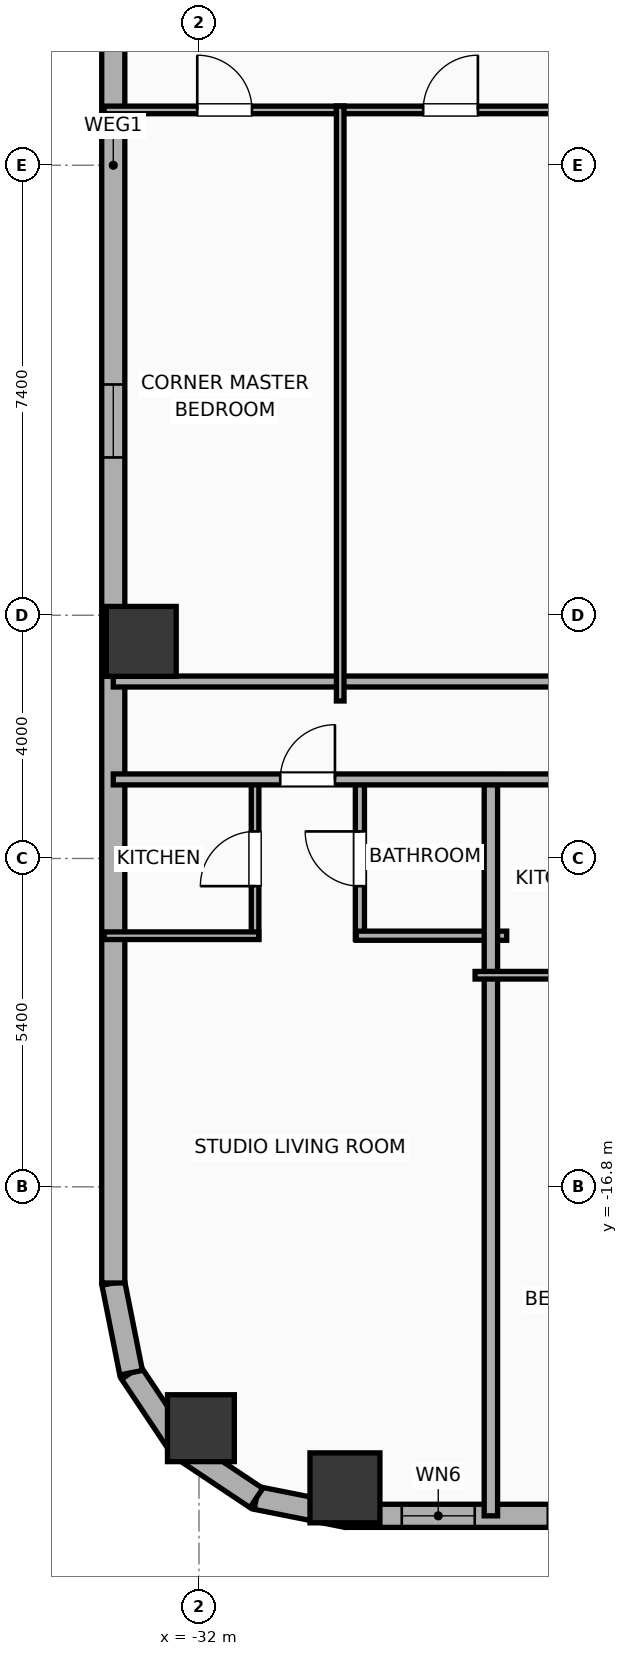
"""IFC4 building model, lengths in metres.
Left out: names, types, materials, properties, quantities, classifications, styles, units other than length and angle.
Written with IfcOpenShell. Run it as: python <this file> out.ifc"""

import sys

from ifc_helpers import new_model, si_unit, direction, frame, frame_2d, origin, origin_2d, place, context, subcontext, project, spatial, rectangle, hollow_rectangle, hollow_circle, extrude, element, fill, save


model = new_model("IFC4")
c1 = context("Model", 3, precision=1e-05, world=origin(), true_north=direction((0.0, 1.0)))
c2 = subcontext(c1, "Body", "Model", "MODEL_VIEW")
j1 = project(units=[si_unit("LENGTHUNIT", "METRE"), si_unit("PLANEANGLEUNIT", "RADIAN")], contexts=[c1])
p1 = place(None, origin())
s1 = spatial("IfcSite", under=j1, at=p1, CompositionType="ELEMENT")
p2 = place(p1, origin())
s2 = spatial("IfcBuilding", under=s1, at=p2, CompositionType="ELEMENT")
p3 = place(p2, frame((0.0, 0.0, 45.5)))
s3 = spatial("IfcBuildingStorey", under=s2, at=p3, CompositionType="ELEMENT", Elevation=45.5)
for number, where, z_axis, x_axis in (
    (1, (-29.6, -21.75, 0.0), (0.0, 0.0, 1.0), (1.0, 0.0, 0.0)),
    (2, (-32.95, -7.83, 0.0), (0.0, 0.0, 1.0), (1.0, 0.0, 0.0)),
):
    element("IfcColumn", number, at=place(p3, frame(where, z_axis=z_axis, x_axis=x_axis)), inside=s3, PredefinedType="COLUMN", context=c2, shape_type="SweptSolid", body=[
        extrude(hollow_rectangle(XDim=1.15, YDim=1.15, WallThickness=0.04, at=origin_2d()), origin(), (0.0, 0.0, 1.0), 3.9),
    ])
p4 = place(p3, frame((-31.969, -20.769, 0.0), z_axis=(0.0, 0.0, 1.0), x_axis=(1.0, 0.0, 0.0)))
e3 = element("IfcColumn", 3, at=p4, inside=s3, PredefinedType="COLUMN", context=c2, shape_type="SweptSolid", body=[
    extrude(hollow_circle(Radius=0.55, WallThickness=0.036, at=origin_2d()), origin(), (0.0, 0.0, 1.0), 3.9),
])
p5 = place(p3, frame((22.381, -22.21, 0.0), z_axis=(0.0, 0.0, 1.0), x_axis=(-1.0, 0.0, 0.0)))
e4 = element("IfcWall", 4, at=p5, inside=s3, PredefinedType="ELEMENTEDWALL", context=c2, shape_type="SweptSolid", body=[
    extrude(rectangle(XDim=51.963, YDim=0.38, at=frame_2d((25.981, 0.0))), origin(), (0.0, 0.0, 1.0), 3.65),
])
p6 = place(p5, frame((42.952, 0.0, 0.75)))
e5 = element("IfcOpeningElement", 5, at=p6, cuts=e4, PredefinedType="OPENING", context=c2, shape_type="SweptSolid", body=[
    extrude(rectangle(XDim=2.4, YDim=2.1, at=frame_2d((1.2, 1.05))), frame((0.0, 0.2, 0.0), z_axis=(0.0, -1.0, 0.0), x_axis=(1.0, 0.0, 0.0)), (0.0, 0.0, 1.0), 0.4),
])
p7 = place(p5, frame((49.847, 0.0, 0.75)))
e6 = element("IfcOpeningElement", 6, at=p7, cuts=e4, PredefinedType="OPENING", context=c2, shape_type="SweptSolid", body=[
    extrude(rectangle(XDim=1.2, YDim=2.05, at=frame_2d((0.6, 1.025))), frame((0.0, 0.2, 0.0), z_axis=(0.0, -1.0, 0.0), x_axis=(1.0, 0.0, 0.0)), (0.0, 0.0, 1.0), 0.4),
])
p8 = place(p5, frame((47.445, 0.0, 0.75)))
e7 = element("IfcOpeningElement", 7, at=p8, cuts=e4, PredefinedType="OPENING", context=c2, shape_type="SweptSolid", body=[
    extrude(rectangle(XDim=1.2, YDim=2.05, at=frame_2d((0.6, 1.025))), frame((0.0, 0.2, 0.0), z_axis=(0.0, -1.0, 0.0), x_axis=(1.0, 0.0, 0.0)), (0.0, 0.0, 1.0), 0.4),
])
p9 = place(p5, frame((39.526, 0.0, 0.75)))
e8 = element("IfcOpeningElement", 8, at=p9, cuts=e4, PredefinedType="OPENING", context=c2, shape_type="SweptSolid", body=[
    extrude(rectangle(XDim=1.2, YDim=2.05, at=frame_2d((0.6, 1.025))), frame((0.0, 0.2, 0.0), z_axis=(0.0, -1.0, 0.0), x_axis=(1.0, 0.0, 0.0)), (0.0, 0.0, 1.0), 0.4),
])
p10 = place(p5, frame((33.018, 0.0, 0.75)))
e9 = element("IfcOpeningElement", 9, at=p10, cuts=e4, PredefinedType="OPENING", context=c2, shape_type="SweptSolid", body=[
    extrude(rectangle(XDim=1.2, YDim=2.05, at=frame_2d((0.6, 1.025))), frame((0.0, 0.2, 0.0), z_axis=(0.0, -1.0, 0.0), x_axis=(1.0, 0.0, 0.0)), (0.0, 0.0, 1.0), 0.4),
])
p11 = place(p5, frame((36.813, 0.0, 0.75)))
e10 = element("IfcOpeningElement", 10, at=p11, cuts=e4, PredefinedType="OPENING", context=c2, shape_type="SweptSolid", body=[
    extrude(rectangle(XDim=1.2, YDim=2.05, at=frame_2d((0.6, 1.025))), frame((0.0, 0.2, 0.0), z_axis=(0.0, -1.0, 0.0), x_axis=(1.0, 0.0, 0.0)), (0.0, 0.0, 1.0), 0.4),
])
p12 = place(p5, frame((28.886, 0.0, 0.75)))
e11 = element("IfcOpeningElement", 11, at=p12, cuts=e4, PredefinedType="OPENING", context=c2, shape_type="SweptSolid", body=[
    extrude(rectangle(XDim=1.2, YDim=2.05, at=frame_2d((0.6, 1.025))), frame((0.0, 0.2, 0.0), z_axis=(0.0, -1.0, 0.0), x_axis=(1.0, 0.0, 0.0)), (0.0, 0.0, 1.0), 0.4),
])
p13 = place(p5, frame((23.306, 0.0, 0.75)))
e12 = element("IfcOpeningElement", 12, at=p13, cuts=e4, PredefinedType="OPENING", context=c2, shape_type="SweptSolid", body=[
    extrude(rectangle(XDim=1.2, YDim=2.05, at=frame_2d((0.6, 1.025))), frame((0.0, 0.2, 0.0), z_axis=(0.0, -1.0, 0.0), x_axis=(1.0, 0.0, 0.0)), (0.0, 0.0, 1.0), 0.4),
])
p14 = place(p5, frame((26.056, 0.0, 0.75)))
e13 = element("IfcOpeningElement", 13, at=p14, cuts=e4, PredefinedType="OPENING", context=c2, shape_type="SweptSolid", body=[
    extrude(rectangle(XDim=1.2, YDim=2.05, at=frame_2d((0.6, 1.025))), frame((0.0, 0.2, 0.0), z_axis=(0.0, -1.0, 0.0), x_axis=(1.0, 0.0, 0.0)), (0.0, 0.0, 1.0), 0.4),
])
p15 = place(p5, frame((18.811, 0.0, 0.75)))
e14 = element("IfcOpeningElement", 14, at=p15, cuts=e4, PredefinedType="OPENING", context=c2, shape_type="SweptSolid", body=[
    extrude(rectangle(XDim=1.2, YDim=2.05, at=frame_2d((0.6, 1.025))), frame((0.0, 0.2, 0.0), z_axis=(0.0, -1.0, 0.0), x_axis=(1.0, 0.0, 0.0)), (0.0, 0.0, 1.0), 0.4),
])
p16 = place(p5, frame((14.602, 0.0, 0.75)))
e15 = element("IfcOpeningElement", 15, at=p16, cuts=e4, PredefinedType="OPENING", context=c2, shape_type="SweptSolid", body=[
    extrude(rectangle(XDim=1.2, YDim=2.05, at=frame_2d((0.6, 1.025))), frame((0.0, 0.2, 0.0), z_axis=(0.0, -1.0, 0.0), x_axis=(1.0, 0.0, 0.0)), (0.0, 0.0, 1.0), 0.4),
])
p17 = place(p5, frame((11.852, 0.0, 0.75)))
e16 = element("IfcOpeningElement", 16, at=p17, cuts=e4, PredefinedType="OPENING", context=c2, shape_type="SweptSolid", body=[
    extrude(rectangle(XDim=1.2, YDim=2.05, at=frame_2d((0.6, 1.025))), frame((0.0, 0.2, 0.0), z_axis=(0.0, -1.0, 0.0), x_axis=(1.0, 0.0, 0.0)), (0.0, 0.0, 1.0), 0.4),
])
p18 = place(p5, frame((8.316, 0.0, 0.75)))
e17 = element("IfcOpeningElement", 17, at=p18, cuts=e4, PredefinedType="OPENING", context=c2, shape_type="SweptSolid", body=[
    extrude(rectangle(XDim=1.2, YDim=2.05, at=frame_2d((0.6, 1.025))), frame((0.0, 0.2, 0.0), z_axis=(0.0, -1.0, 0.0), x_axis=(1.0, 0.0, 0.0)), (0.0, 0.0, 1.0), 0.4),
])
p19 = place(p5, frame((6.286, 0.0, 0.75)))
e18 = element("IfcOpeningElement", 18, at=p19, cuts=e4, PredefinedType="OPENING", context=c2, shape_type="SweptSolid", body=[
    extrude(rectangle(XDim=1.2, YDim=2.05, at=frame_2d((0.6, 1.025))), frame((0.0, 0.2, 0.0), z_axis=(0.0, -1.0, 0.0), x_axis=(1.0, 0.0, 0.0)), (0.0, 0.0, 1.0), 0.4),
])
p20 = place(p5, frame((3.737, 0.0, 0.75)))
e19 = element("IfcOpeningElement", 19, at=p20, cuts=e4, PredefinedType="OPENING", context=c2, shape_type="SweptSolid", body=[
    extrude(rectangle(XDim=1.2, YDim=2.05, at=frame_2d((0.6, 1.025))), frame((0.0, 0.2, 0.0), z_axis=(0.0, -1.0, 0.0), x_axis=(1.0, 0.0, 0.0)), (0.0, 0.0, 1.0), 0.4),
])
p21 = place(p5, frame((1.291, 0.0, 0.75)))
e20 = element("IfcOpeningElement", 20, at=p21, cuts=e4, PredefinedType="OPENING", context=c2, shape_type="SweptSolid", body=[
    extrude(rectangle(XDim=1.2, YDim=2.05, at=frame_2d((0.6, 1.025))), frame((0.0, 0.2, 0.0), z_axis=(0.0, -1.0, 0.0), x_axis=(1.0, 0.0, 0.0)), (0.0, 0.0, 1.0), 0.4),
])
p22 = place(p3, frame((-29.581, -22.21, 0.0), z_axis=(0.0, 0.0, 1.0), x_axis=(-0.980786132421, 0.195086038585, 0.0)))
e21 = element("IfcWall", 21, at=p22, inside=s3, PredefinedType="ELEMENTEDWALL", context=c2, shape_type="SweptSolid", body=[
    extrude(rectangle(XDim=1.504, YDim=0.38, at=frame_2d((0.752, 0.0))), origin(), (0.0, 0.0, 1.0), 3.65),
])
p23 = place(p3, frame((-31.057, -21.917, 0.0), z_axis=(0.0, 0.0, 1.0), x_axis=(-0.831442848281, 0.555610286119, 0.0)))
e22 = element("IfcWall", 22, at=p23, inside=s3, PredefinedType="ELEMENTEDWALL", context=c2, shape_type="SweptSolid", body=[
    extrude(rectangle(XDim=1.485, YDim=0.38, at=frame_2d((0.743, 0.0))), origin(), (0.0, 0.0, 1.0), 3.65),
])
p24 = place(p3, frame((-32.292, -21.091, 0.0), z_axis=(0.0, 0.0, 1.0), x_axis=(-0.555572577804, 0.831468045563, 0.0)))
e23 = element("IfcWall", 23, at=p24, inside=s3, PredefinedType="ELEMENTEDWALL", context=c2, shape_type="SweptSolid", body=[
    extrude(rectangle(XDim=1.485, YDim=0.38, at=frame_2d((0.742, 0.0))), origin(), (0.0, 0.0, 1.0), 3.65),
])
p25 = place(p3, frame((-33.116, -19.857, 0.0), z_axis=(0.0, 0.0, 1.0), x_axis=(-0.195086038585, 0.980786132421, 0.0)))
e24 = element("IfcWall", 24, at=p25, inside=s3, PredefinedType="ELEMENTEDWALL", context=c2, shape_type="SweptSolid", body=[
    extrude(rectangle(XDim=1.504, YDim=0.38, at=frame_2d((0.752, 0.0))), origin(), (0.0, 0.0, 1.0), 3.65),
])
p26 = place(p3, frame((-33.41, -18.381, 0.0), z_axis=(0.0, 0.0, 1.0), x_axis=(0.0, 1.0, 0.0)))
e25 = element("IfcWall", 25, at=p26, inside=s3, PredefinedType="ELEMENTEDWALL", context=c2, shape_type="SweptSolid", body=[
    extrude(rectangle(XDim=36.763, YDim=0.38, at=frame_2d((18.381, 0.0))), origin(), (0.0, 0.0, 1.0), 3.65),
])
p27 = place(p26, frame((33.187, 0.0, 0.75)))
e26 = element("IfcOpeningElement", 26, at=p27, cuts=e25, PredefinedType="OPENING", context=c2, shape_type="SweptSolid", body=[
    extrude(rectangle(XDim=1.2, YDim=2.05, at=frame_2d((0.6, 1.025))), frame((0.0, 0.2, 0.0), z_axis=(0.0, -1.0, 0.0), x_axis=(1.0, 0.0, 0.0)), (0.0, 0.0, 1.0), 0.4),
])
p28 = place(p26, frame((22.126, 0.0, 0.75)))
e27 = element("IfcOpeningElement", 27, at=p28, cuts=e25, PredefinedType="OPENING", context=c2, shape_type="SweptSolid", body=[
    extrude(rectangle(XDim=1.2, YDim=2.05, at=frame_2d((0.6, 1.025))), frame((0.0, 0.2, 0.0), z_axis=(0.0, -1.0, 0.0), x_axis=(1.0, 0.0, 0.0)), (0.0, 0.0, 1.0), 0.4),
])
p29 = place(p26, frame((13.576, 0.0, 0.75)))
e28 = element("IfcOpeningElement", 28, at=p29, cuts=e25, PredefinedType="OPENING", context=c2, shape_type="SweptSolid", body=[
    extrude(rectangle(XDim=1.2, YDim=2.05, at=frame_2d((0.6, 1.025))), frame((0.0, 0.2, 0.0), z_axis=(0.0, -1.0, 0.0), x_axis=(1.0, 0.0, 0.0)), (0.0, 0.0, 1.0), 0.4),
])
p30 = place(p3, frame((-33.41, -8.49, 0.0), z_axis=(0.0, 0.0, 1.0), x_axis=(1.0, 0.0, 0.0)))
e29 = element("IfcWall", 29, at=p30, inside=s3, PredefinedType="PARTITIONING", context=c2, shape_type="SweptSolid", body=[
    extrude(rectangle(XDim=23.53, YDim=0.18, at=frame_2d((11.765, 0.0))), origin(), (0.0, 0.0, 1.0), 3.65),
])
p31 = place(p3, frame((-31.078, -12.73, 0.0), z_axis=(0.0, 0.0, 1.0), x_axis=(0.0, 1.0, 0.0)))
e30 = element("IfcWall", 30, at=p31, inside=s3, PredefinedType="PARTITIONING", context=c2, shape_type="SweptSolid", body=[
    extrude(rectangle(XDim=2.65, YDim=0.125, at=frame_2d((1.325, 0.0))), origin(), (0.0, 0.0, 1.0), 3.65),
])
p32 = place(p31, frame((0.875, 0.0, 0.0)))
e31 = element("IfcOpeningElement", 31, at=p32, cuts=e30, PredefinedType="OPENING", context=c2, shape_type="SweptSolid", body=[
    extrude(rectangle(XDim=0.9, YDim=2.05, at=frame_2d((0.45, 1.025))), frame((0.0, 0.073, 0.0), z_axis=(0.0, -1.0, 0.0), x_axis=(1.0, 0.0, 0.0)), (0.0, 0.0, 1.0), 0.145),
])
p33 = place(p3, frame((-29.354, -12.73, 0.0), z_axis=(0.0, 0.0, 1.0), x_axis=(0.0, 1.0, 0.0)))
e32 = element("IfcWall", 32, at=p33, inside=s3, PredefinedType="PLUMBINGWALL", context=c2, shape_type="SweptSolid", body=[
    extrude(rectangle(XDim=2.65, YDim=0.15, at=frame_2d((1.325, 0.0))), origin(), (0.0, 0.0, 1.0), 3.65),
])
p34 = place(p33, frame((0.875, 0.0, 0.0)))
e33 = element("IfcOpeningElement", 33, at=p34, cuts=e32, PredefinedType="OPENING", context=c2, shape_type="SweptSolid", body=[
    extrude(rectangle(XDim=0.9, YDim=2.05, at=frame_2d((0.45, 1.025))), frame((0.0, 0.085, 0.0), z_axis=(0.0, -1.0, 0.0), x_axis=(1.0, 0.0, 0.0)), (0.0, 0.0, 1.0), 0.17),
])
p35 = place(p3, frame((-33.56, -12.67, 0.0), z_axis=(0.0, 0.0, 1.0), x_axis=(1.0, 0.0, 0.0)))
e34 = element("IfcWall", 34, at=p35, inside=s3, PredefinedType="PARTITIONING", context=c2, shape_type="SweptSolid", body=[
    extrude(rectangle(XDim=2.542, YDim=0.125, at=frame_2d((1.271, 0.0))), origin(), (0.0, 0.0, 1.0), 3.65),
])
p36 = place(p3, frame((-29.414, -12.67, 0.0), z_axis=(0.0, 0.0, 1.0), x_axis=(1.0, 0.0, 0.0)))
e35 = element("IfcWall", 35, at=p36, inside=s3, PredefinedType="PLUMBINGWALL", context=c2, shape_type="SweptSolid", body=[
    extrude(rectangle(XDim=2.474, YDim=0.15, at=frame_2d((1.237, 0.0))), origin(), (0.0, 0.0, 1.0), 3.65),
])
p37 = place(p3, frame((-27.2, -22.21, 0.0), z_axis=(0.0, 0.0, 1.0), x_axis=(0.0, 1.0, 0.0)))
e36 = element("IfcWall", 36, at=p37, inside=s3, PredefinedType="PARTITIONING", context=c2, shape_type="SweptSolid", body=[
    extrude(rectangle(XDim=12.19, YDim=0.22, at=frame_2d((6.095, 0.0))), origin(), (0.0, 0.0, 1.0), 3.65),
])
p38 = place(p3, frame((-27.46, -13.32, 0.0), z_axis=(0.0, 0.0, 1.0), x_axis=(1.0, 0.0, 0.0)))
e37 = element("IfcWall", 37, at=p38, inside=s3, PredefinedType="PARTITIONING", context=c2, shape_type="SweptSolid", body=[
    extrude(rectangle(XDim=3.452, YDim=0.125, at=frame_2d((1.726, 0.0))), origin(), (0.0, 0.0, 1.0), 3.65),
])
p39 = place(p3, frame((-33.41, -10.1, 0.0), z_axis=(0.0, 0.0, 1.0), x_axis=(1.0, 0.0, 0.0)))
e38 = element("IfcWall", 38, at=p39, inside=s3, PredefinedType="PARTITIONING", context=c2, shape_type="SweptSolid", body=[
    extrude(rectangle(XDim=59.62, YDim=0.18, at=frame_2d((29.81, 0.0))), origin(), (0.0, 0.0, 1.0), 3.65),
])
p40 = place(p39, frame((2.746, 0.0, 0.0)))
e39 = element("IfcOpeningElement", 39, at=p40, cuts=e38, PredefinedType="OPENING", context=c2, shape_type="SweptSolid", body=[
    extrude(rectangle(XDim=0.9, YDim=2.05, at=frame_2d((0.45, 1.025))), frame((0.0, 0.1, 0.0), z_axis=(0.0, -1.0, 0.0), x_axis=(1.0, 0.0, 0.0)), (0.0, 0.0, 1.0), 0.2),
])
p41 = place(p39, frame((11.552, 0.0, 0.0)))
e40 = element("IfcOpeningElement", 40, at=p41, cuts=e38, PredefinedType="OPENING", context=c2, shape_type="SweptSolid", body=[
    extrude(rectangle(XDim=1.15, YDim=2.05, at=frame_2d((0.575, 1.025))), frame((0.0, 0.1, 0.0), z_axis=(0.0, -1.0, 0.0), x_axis=(1.0, 0.0, 0.0)), (0.0, 0.0, 1.0), 0.2),
])
p42 = place(p39, frame((22.379, 0.0, 0.0)))
e41 = element("IfcOpeningElement", 41, at=p42, cuts=e38, PredefinedType="OPENING", context=c2, shape_type="SweptSolid", body=[
    extrude(rectangle(XDim=1.15, YDim=2.05, at=frame_2d((0.575, 1.025))), frame((0.0, 0.1, 0.0), z_axis=(0.0, -1.0, 0.0), x_axis=(1.0, 0.0, 0.0)), (0.0, 0.0, 1.0), 0.2),
])
p43 = place(p39, frame((31.28, 0.0, 0.0)))
e42 = element("IfcOpeningElement", 42, at=p43, cuts=e38, PredefinedType="OPENING", context=c2, shape_type="SweptSolid", body=[
    extrude(rectangle(XDim=1.15, YDim=2.05, at=frame_2d((0.575, 1.025))), frame((0.0, 0.1, 0.0), z_axis=(0.0, -1.0, 0.0), x_axis=(1.0, 0.0, 0.0)), (0.0, 0.0, 1.0), 0.2),
])
p44 = place(p39, frame((36.02, 0.0, 0.0)))
e43 = element("IfcOpeningElement", 43, at=p44, cuts=e38, PredefinedType="OPENING", context=c2, shape_type="SweptSolid", body=[
    extrude(rectangle(XDim=0.9, YDim=2.05, at=frame_2d((0.45, 1.025))), frame((0.0, 0.1, 0.0), z_axis=(0.0, -1.0, 0.0), x_axis=(1.0, 0.0, 0.0)), (0.0, 0.0, 1.0), 0.2),
])
p45 = place(p39, frame((40.044, 0.0, 0.0)))
e44 = element("IfcOpeningElement", 44, at=p45, cuts=e38, PredefinedType="OPENING", context=c2, shape_type="SweptSolid", body=[
    extrude(rectangle(XDim=1.15, YDim=2.05, at=frame_2d((0.575, 1.025))), frame((0.0, 0.1, 0.0), z_axis=(0.0, -1.0, 0.0), x_axis=(1.0, 0.0, 0.0)), (0.0, 0.0, 1.0), 0.2),
])
p46 = place(p39, frame((45.613, 0.0, 0.0)))
e45 = element("IfcOpeningElement", 45, at=p46, cuts=e38, PredefinedType="OPENING", context=c2, shape_type="SweptSolid", body=[
    extrude(rectangle(XDim=1.15, YDim=2.05, at=frame_2d((0.575, 1.025))), frame((0.0, 0.1, 0.0), z_axis=(0.0, -1.0, 0.0), x_axis=(1.0, 0.0, 0.0)), (0.0, 0.0, 1.0), 0.2),
])
p47 = place(p39, frame((54.174, 0.0, 0.0)))
e46 = element("IfcOpeningElement", 46, at=p47, cuts=e38, PredefinedType="OPENING", context=c2, shape_type="SweptSolid", body=[
    extrude(rectangle(XDim=1.15, YDim=2.05, at=frame_2d((0.575, 1.025))), frame((0.0, 0.1, 0.0), z_axis=(0.0, -1.0, 0.0), x_axis=(1.0, 0.0, 0.0)), (0.0, 0.0, 1.0), 0.2),
])
p48 = place(p3, frame((-33.56, 0.91, 0.0), z_axis=(0.0, 0.0, 1.0), x_axis=(1.0, 0.0, 0.0)))
e47 = element("IfcWall", 47, at=p48, inside=s3, PredefinedType="PARTITIONING", context=c2, shape_type="SweptSolid", body=[
    extrude(rectangle(XDim=3.945, YDim=0.125, at=frame_2d((1.972, 0.0))), origin(), (0.0, 0.0, 1.0), 3.65),
])
p49 = place(p48, frame((1.531, 0.0, 0.0)))
e48 = element("IfcOpeningElement", 48, at=p49, cuts=e47, PredefinedType="OPENING", context=c2, shape_type="SweptSolid", body=[
    extrude(rectangle(XDim=0.9, YDim=2.05, at=frame_2d((0.45, 1.025))), frame((0.0, 0.073, 0.0), z_axis=(0.0, -1.0, 0.0), x_axis=(1.0, 0.0, 0.0)), (0.0, 0.0, 1.0), 0.145),
])
p50 = place(p3, frame((-29.74, 0.91, 0.0), z_axis=(0.0, 0.0, 1.0), x_axis=(1.0, 0.0, 0.0)))
e49 = element("IfcWall", 49, at=p50, inside=s3, PredefinedType="PARTITIONING", context=c2, shape_type="SweptSolid", body=[
    extrude(rectangle(XDim=3.754, YDim=0.125, at=frame_2d((1.877, 0.0))), origin(), (0.0, 0.0, 1.0), 3.65),
])
p51 = place(p50, frame((1.427, 0.0, 0.0)))
e50 = element("IfcOpeningElement", 50, at=p51, cuts=e49, PredefinedType="OPENING", context=c2, shape_type="SweptSolid", body=[
    extrude(rectangle(XDim=0.9, YDim=2.05, at=frame_2d((0.45, 1.025))), frame((0.0, 0.073, 0.0), z_axis=(0.0, -1.0, 0.0), x_axis=(1.0, 0.0, 0.0)), (0.0, 0.0, 1.0), 0.145),
])
p52 = place(p3, frame((-29.678, -8.81, 0.0), z_axis=(0.0, 0.0, 1.0), x_axis=(0.0, 1.0, 0.0)))
e51 = element("IfcWall", 51, at=p52, inside=s3, PredefinedType="PARTITIONING", context=c2, shape_type="SweptSolid", body=[
    extrude(rectangle(XDim=9.78, YDim=0.125, at=frame_2d((4.89, 0.0))), origin(), (0.0, 0.0, 1.0), 3.65),
])
p53 = place(p7, origin())
e52 = element("IfcWindow", 52, at=p53, inside=s3, PartitioningType="SINGLE_PANEL", PredefinedType="WINDOW", context=c2, shape_type="SweptSolid", body=[
    extrude(rectangle(XDim=1.2, YDim=2.05, at=frame_2d((0.6, 1.025))), frame((0.0, 0.03, 0.0), z_axis=(0.0, -1.0, 0.0), x_axis=(1.0, 0.0, 0.0)), (0.0, 0.0, 1.0), 0.06),
])
fill(e6, e52)
p54 = place(p8, origin())
e53 = element("IfcWindow", 53, at=p54, inside=s3, PartitioningType="SINGLE_PANEL", PredefinedType="WINDOW", context=c2, shape_type="SweptSolid", body=[
    extrude(rectangle(XDim=1.2, YDim=2.05, at=frame_2d((0.6, 1.025))), frame((0.0, 0.03, 0.0), z_axis=(0.0, -1.0, 0.0), x_axis=(1.0, 0.0, 0.0)), (0.0, 0.0, 1.0), 0.06),
])
fill(e7, e53)
p55 = place(p29, origin())
e54 = element("IfcWindow", 54, at=p55, inside=s3, PartitioningType="SINGLE_PANEL", PredefinedType="WINDOW", context=c2, shape_type="SweptSolid", body=[
    extrude(rectangle(XDim=1.2, YDim=2.05, at=frame_2d((0.6, 1.025))), frame((0.0, 0.03, 0.0), z_axis=(0.0, -1.0, 0.0), x_axis=(1.0, 0.0, 0.0)), (0.0, 0.0, 1.0), 0.06),
])
fill(e28, e54)
p56 = place(p32, origin())
e55 = element("IfcDoor", 55, at=p56, inside=s3, OperationType="SINGLE_SWING_LEFT", PredefinedType="DOOR", context=c2, shape_type="SweptSolid", body=[
    extrude(rectangle(XDim=0.9, YDim=2.05, at=frame_2d((0.45, 1.025))), frame((0.0, 0.025, 0.0), z_axis=(0.0, -1.0, 0.0), x_axis=(1.0, 0.0, 0.0)), (0.0, 0.0, 1.0), 0.05),
])
fill(e31, e55)
p57 = place(p34, origin())
e56 = element("IfcDoor", 56, at=p57, inside=s3, OperationType="SINGLE_SWING_RIGHT", PredefinedType="DOOR", context=c2, shape_type="SweptSolid", body=[
    extrude(rectangle(XDim=0.9, YDim=2.05, at=frame_2d((0.45, 1.025))), frame((0.0, 0.025, 0.0), z_axis=(0.0, -1.0, 0.0), x_axis=(1.0, 0.0, 0.0)), (0.0, 0.0, 1.0), 0.05),
])
fill(e33, e56)
p58 = place(p40, origin())
e57 = element("IfcDoor", 57, at=p58, inside=s3, OperationType="SINGLE_SWING_RIGHT", PredefinedType="DOOR", context=c2, shape_type="SweptSolid", body=[
    extrude(rectangle(XDim=0.9, YDim=2.05, at=frame_2d((0.45, 1.025))), frame((0.0, 0.025, 0.0), z_axis=(0.0, -1.0, 0.0), x_axis=(1.0, 0.0, 0.0)), (0.0, 0.0, 1.0), 0.05),
])
fill(e39, e57)
p59 = place(p49, origin())
e58 = element("IfcDoor", 58, at=p59, inside=s3, OperationType="SINGLE_SWING_LEFT", PredefinedType="DOOR", context=c2, shape_type="SweptSolid", body=[
    extrude(rectangle(XDim=0.9, YDim=2.05, at=frame_2d((0.45, 1.025))), frame((0.0, 0.025, 0.0), z_axis=(0.0, -1.0, 0.0), x_axis=(1.0, 0.0, 0.0)), (0.0, 0.0, 1.0), 0.05),
])
fill(e48, e58)
p60 = place(p51, origin())
e59 = element("IfcDoor", 59, at=p60, inside=s3, OperationType="SINGLE_SWING_RIGHT", PredefinedType="DOOR", context=c2, shape_type="SweptSolid", body=[
    extrude(rectangle(XDim=0.9, YDim=2.05, at=frame_2d((0.45, 1.025))), frame((0.0, 0.025, 0.0), z_axis=(0.0, -1.0, 0.0), x_axis=(1.0, 0.0, 0.0)), (0.0, 0.0, 1.0), 0.05),
])
fill(e50, e59)
save(model, sys.argv[1])
